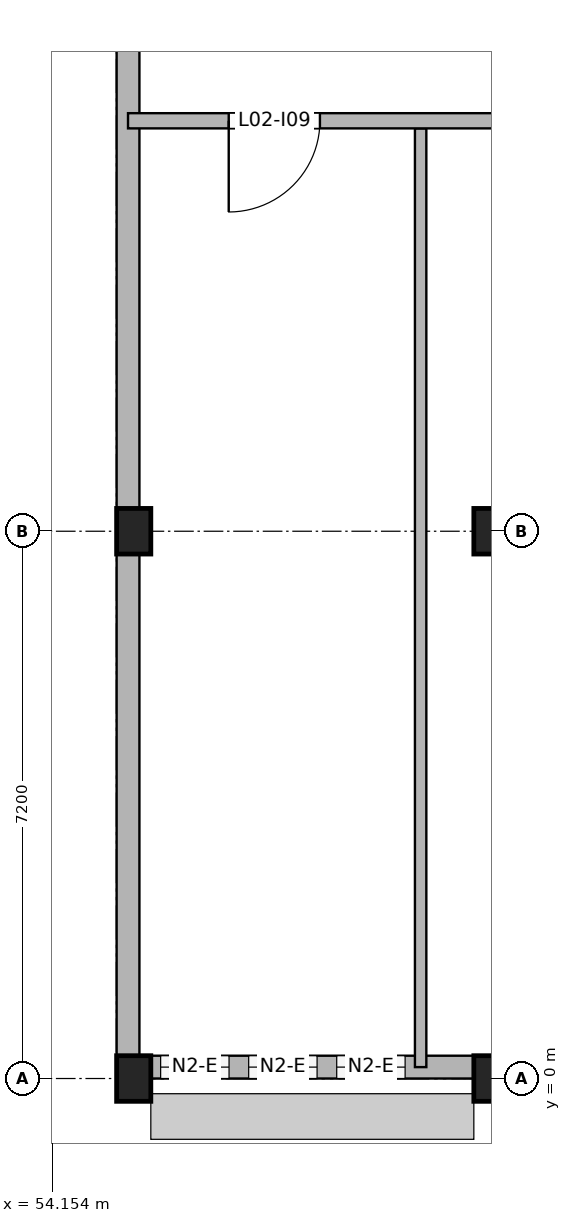
"""IFC4 building model, lengths in metres.
Left out: names, types, materials, properties, quantities, classifications, styles, units other than length and angle.
Written with IfcOpenShell. Run it as: python <this file> out.ifc"""

import sys

from ifc_helpers import new_model, si_unit, direction, frame, frame_2d, origin, origin_2d, place, context, subcontext, project, spatial, rectangle, extrude, element, fill, save


model = new_model("IFC4")
c1 = context("Model", 3, precision=1e-05, world=origin(), true_north=direction((0.0, 1.0)))
c2 = subcontext(c1, "Body", "Model", "MODEL_VIEW")
j1 = project(units=[si_unit("LENGTHUNIT", "METRE"), si_unit("PLANEANGLEUNIT", "RADIAN")], contexts=[c1])
p1 = place(None, origin())
s1 = spatial("IfcSite", under=j1, at=p1, CompositionType="ELEMENT")
p2 = place(p1, origin())
s2 = spatial("IfcBuilding", under=s1, at=p2, CompositionType="ELEMENT")
p3 = place(p2, frame((0.0, 0.0, 8.4)))
s3 = spatial("IfcBuildingStorey", under=s2, at=p3, CompositionType="ELEMENT", Elevation=8.4)
p4 = place(p3, frame((55.225, 0.0, 0.0), z_axis=(0.0, 0.0, 1.0), x_axis=(1.0, 0.0, 0.0)))
e1 = element("IfcColumn", 1, at=p4, inside=s3, PredefinedType="COLUMN", context=c2, shape_type="SweptSolid", body=[
    extrude(rectangle(XDim=0.45, YDim=0.6, at=origin_2d()), origin(), (0.0, 0.0, 1.0), 3.95),
])
p5 = place(p3, frame((60.0, 0.0, 0.0), z_axis=(0.0, 0.0, 1.0), x_axis=(1.0, 0.0, 0.0)))
e2 = element("IfcColumn", 2, at=p5, inside=s3, PredefinedType="COLUMN", context=c2, shape_type="SweptSolid", body=[
    extrude(rectangle(XDim=0.6, YDim=0.6, at=origin_2d()), origin(), (0.0, 0.0, 1.0), 3.95),
])
p6 = place(p3, frame((55.225, 7.2, 0.0), z_axis=(0.0, 0.0, 1.0), x_axis=(1.0, 0.0, 0.0)))
e3 = element("IfcColumn", 3, at=p6, inside=s3, PredefinedType="COLUMN", context=c2, shape_type="SweptSolid", body=[
    extrude(rectangle(XDim=0.45, YDim=0.6, at=origin_2d()), origin(), (0.0, 0.0, 1.0), 3.95),
])
p7 = place(p3, frame((60.0, 7.2, 0.0), z_axis=(0.0, 0.0, 1.0), x_axis=(1.0, 0.0, 0.0)))
e4 = element("IfcColumn", 4, at=p7, inside=s3, PredefinedType="COLUMN", context=c2, shape_type="SweptSolid", body=[
    extrude(rectangle(XDim=0.6, YDim=0.6, at=origin_2d()), origin(), (0.0, 0.0, 1.0), 3.95),
])
p8 = place(p3, frame((55.45, 0.15, 0.0), z_axis=(0.0, 0.0, 1.0), x_axis=(1.0, 0.0, 0.0)))
e5 = element("IfcWall", 5, at=p8, inside=s3, PredefinedType="SOLIDWALL", context=c2, shape_type="SweptSolid", body=[
    extrude(rectangle(XDim=4.25, YDim=0.3, at=frame_2d((2.125, 0.0))), origin(), (0.0, 0.0, 1.0), 3.15),
])
p9 = place(p8, frame((0.129, 0.0, 0.9)))
e6 = element("IfcOpeningElement", 6, at=p9, cuts=e5, PredefinedType="OPENING", context=c2, shape_type="SweptSolid", body=[
    extrude(rectangle(XDim=0.9, YDim=1.2, at=frame_2d((0.45, 0.6))), frame((0.0, 0.16, 0.0), z_axis=(0.0, -1.0, 0.0), x_axis=(1.0, 0.0, 0.0)), (0.0, 0.0, 1.0), 0.32),
])
p10 = place(p8, frame((1.288, 0.0, 0.9)))
e7 = element("IfcOpeningElement", 7, at=p10, cuts=e5, PredefinedType="OPENING", context=c2, shape_type="SweptSolid", body=[
    extrude(rectangle(XDim=0.9, YDim=1.2, at=frame_2d((0.45, 0.6))), frame((0.0, 0.16, 0.0), z_axis=(0.0, -1.0, 0.0), x_axis=(1.0, 0.0, 0.0)), (0.0, 0.0, 1.0), 0.32),
])
p11 = place(p8, frame((2.446, 0.0, 0.9)))
e8 = element("IfcOpeningElement", 8, at=p11, cuts=e5, PredefinedType="OPENING", context=c2, shape_type="SweptSolid", body=[
    extrude(rectangle(XDim=0.9, YDim=1.2, at=frame_2d((0.45, 0.6))), frame((0.0, 0.16, 0.0), z_axis=(0.0, -1.0, 0.0), x_axis=(1.0, 0.0, 0.0)), (0.0, 0.0, 1.0), 0.32),
])
p12 = place(p3, frame((55.15, 0.3, 0.0), z_axis=(0.0, 0.0, 1.0), x_axis=(0.0, 1.0, 0.0)))
e9 = element("IfcWall", 9, at=p12, inside=s3, PredefinedType="SOLIDWALL", context=c2, shape_type="SweptSolid", body=[
    extrude(rectangle(XDim=6.6, YDim=0.3, at=frame_2d((3.3, 0.0))), origin(), (0.0, 0.0, 1.0), 3.15),
])
p13 = place(p3, frame((55.15, 7.5, 0.0), z_axis=(0.0, 0.0, 1.0), x_axis=(0.0, 1.0, 0.0)))
e10 = element("IfcWall", 10, at=p13, inside=s3, PredefinedType="SOLIDWALL", context=c2, shape_type="SweptSolid", body=[
    extrude(rectangle(XDim=6.9, YDim=0.3, at=frame_2d((3.45, 0.0))), origin(), (0.0, 0.0, 1.0), 3.15),
])
p14 = place(p3, frame((59.0, 0.15, 0.0), z_axis=(0.0, 0.0, 1.0), x_axis=(0.0, 1.0, 0.0)))
e11 = element("IfcWall", 11, at=p14, inside=s3, PredefinedType="PARTITIONING", context=c2, shape_type="SweptSolid", body=[
    extrude(rectangle(XDim=12.35, YDim=0.15, at=frame_2d((6.175, 0.0))), origin(), (0.0, 0.0, 1.0), 3.15),
])
p15 = place(p3, frame((55.15, 12.6, 0.0), z_axis=(0.0, 0.0, 1.0), x_axis=(1.0, 0.0, 0.0)))
e12 = element("IfcWall", 12, at=p15, inside=s3, PredefinedType="PARTITIONING", context=c2, shape_type="SweptSolid", body=[
    extrude(rectangle(XDim=9.25, YDim=0.2, at=frame_2d((4.625, 0.0))), origin(), (0.0, 0.0, 1.0), 3.15),
])
p16 = place(p15, frame((1.325, 0.0, 0.0)))
e13 = element("IfcOpeningElement", 13, at=p16, cuts=e12, PredefinedType="OPENING", context=c2, shape_type="SweptSolid", body=[
    extrude(rectangle(XDim=1.2, YDim=2.1, at=frame_2d((0.6, 1.05))), frame((0.0, 0.11, 0.0), z_axis=(0.0, -1.0, 0.0), x_axis=(1.0, 0.0, 0.0)), (0.0, 0.0, 1.0), 0.22),
])
p17 = place(p15, frame((4.8, 0.0, 0.0)))
e14 = element("IfcOpeningElement", 14, at=p17, cuts=e12, PredefinedType="OPENING", context=c2, shape_type="SweptSolid", body=[
    extrude(rectangle(XDim=1.2, YDim=2.1, at=frame_2d((0.6, 1.05))), frame((0.0, 0.11, 0.0), z_axis=(0.0, -1.0, 0.0), x_axis=(1.0, 0.0, 0.0)), (0.0, 0.0, 1.0), 0.22),
])
p18 = place(p9, origin())
e15 = element("IfcWindow", 15, at=p18, inside=s3, PartitioningType="SINGLE_PANEL", PredefinedType="WINDOW", context=c2, shape_type="SweptSolid", body=[
    extrude(rectangle(XDim=0.9, YDim=1.2, at=frame_2d((0.45, 0.6))), frame((0.0, 0.03, 0.0), z_axis=(0.0, -1.0, 0.0), x_axis=(1.0, 0.0, 0.0)), (0.0, 0.0, 1.0), 0.06),
])
fill(e6, e15)
p19 = place(p10, origin())
e16 = element("IfcWindow", 16, at=p19, inside=s3, PartitioningType="SINGLE_PANEL", PredefinedType="WINDOW", context=c2, shape_type="SweptSolid", body=[
    extrude(rectangle(XDim=0.9, YDim=1.2, at=frame_2d((0.45, 0.6))), frame((0.0, 0.03, 0.0), z_axis=(0.0, -1.0, 0.0), x_axis=(1.0, 0.0, 0.0)), (0.0, 0.0, 1.0), 0.06),
])
fill(e7, e16)
p20 = place(p11, origin())
e17 = element("IfcWindow", 17, at=p20, inside=s3, PartitioningType="SINGLE_PANEL", PredefinedType="WINDOW", context=c2, shape_type="SweptSolid", body=[
    extrude(rectangle(XDim=0.9, YDim=1.2, at=frame_2d((0.45, 0.6))), frame((0.0, 0.03, 0.0), z_axis=(0.0, -1.0, 0.0), x_axis=(1.0, 0.0, 0.0)), (0.0, 0.0, 1.0), 0.06),
])
fill(e8, e17)
p21 = place(p16, frame((1.2, 0.0, 0.0), z_axis=(0.0, 0.0, 1.0), x_axis=(-1.0, 0.0, 0.0)))
e18 = element("IfcDoor", 18, at=p21, inside=s3, OperationType="SINGLE_SWING_RIGHT", PredefinedType="DOOR", context=c2, shape_type="SweptSolid", body=[
    extrude(rectangle(XDim=1.2, YDim=2.1, at=frame_2d((0.6, 1.05))), frame((0.0, 0.025, 0.0), z_axis=(0.0, -1.0, 0.0), x_axis=(1.0, 0.0, 0.0)), (0.0, 0.0, 1.0), 0.05),
])
fill(e13, e18)
save(model, sys.argv[1])
